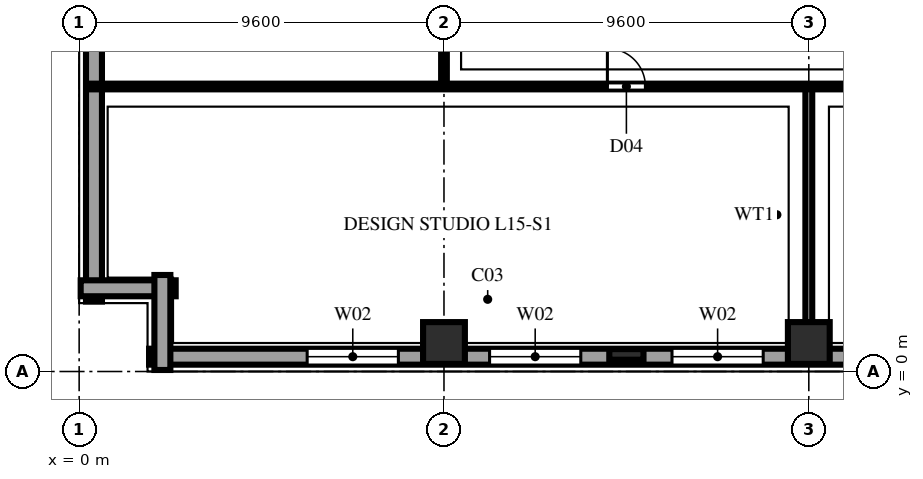
"""IFC4 building model, lengths in metres.
Left out: names, types, materials, properties, quantities, classifications, styles, units other than length and angle.
Written with IfcOpenShell. Run it as: python <this file> out.ifc"""

import sys

from ifc_helpers import new_model, si_unit, direction, frame, frame_2d, origin, origin_2d, place, context, subcontext, project, spatial, rectangle, extrude, element, fill, save


model = new_model("IFC4")
c1 = context("Model", 3, precision=1e-05, world=origin(), true_north=direction((0.0, 1.0)))
c2 = subcontext(c1, "Body", "Model", "MODEL_VIEW")
j1 = project(units=[si_unit("LENGTHUNIT", "METRE"), si_unit("PLANEANGLEUNIT", "RADIAN")], contexts=[c1])
p1 = place(None, origin())
s1 = spatial("IfcSite", under=j1, at=p1, CompositionType="ELEMENT")
p2 = place(p1, origin())
s2 = spatial("IfcBuilding", under=s1, at=p2, CompositionType="ELEMENT")
p3 = place(p2, frame((0.0, 0.0, 62.2)))
s3 = spatial("IfcBuildingStorey", under=s2, at=p3, CompositionType="ELEMENT", Elevation=62.2)
for number, where, z_axis, x_axis in (
    (1, (9.6, 0.75, 0.0), (0.0, 0.0, 1.0), (1.0, 0.0, 0.0)),
    (2, (19.2, 0.75, 0.0), (0.0, 0.0, 1.0), (1.0, 0.0, 0.0)),
):
    element("IfcColumn", number, at=place(p3, frame(where, z_axis=z_axis, x_axis=x_axis)), inside=s3, PredefinedType="COLUMN", context=c2, shape_type="SweptSolid", body=[
        extrude(rectangle(XDim=1.1, YDim=1.1, at=origin_2d()), origin(), (0.0, 0.0, 1.0), 3.8),
    ])
p4 = place(p3, frame((14.4, 0.45, 0.0), z_axis=(0.0, 0.0, 1.0), x_axis=(1.0, 0.0, 0.0)))
e3 = element("IfcColumn", 3, at=p4, inside=s3, PredefinedType="PILASTER", context=c2, shape_type="SweptSolid", body=[
    extrude(rectangle(XDim=0.9, YDim=0.28, at=origin_2d()), origin(), (0.0, 0.0, 1.0), 3.8),
])
p5 = place(p3, frame((1.84, 0.39, 0.0), z_axis=(0.0, 0.0, 1.0), x_axis=(1.0, 0.0, 0.0)))
e4 = element("IfcWall", 4, at=p5, inside=s3, PredefinedType="SOLIDWALL", context=c2, shape_type="SweptSolid", body=[
    extrude(rectangle(XDim=63.52, YDim=0.42, at=frame_2d((31.76, 0.0))), origin(), (0.0, 0.0, 1.0), 3.54),
])
p6 = place(p5, frame((4.16, 0.0, 0.85)))
e5 = element("IfcOpeningElement", 5, at=p6, cuts=e4, PredefinedType="OPENING", context=c2, shape_type="SweptSolid", body=[
    extrude(rectangle(XDim=2.4, YDim=1.85, at=frame_2d((1.2, 0.925))), frame((0.0, 0.222, 0.0), z_axis=(0.0, -1.0, 0.0), x_axis=(1.0, 0.0, 0.0)), (0.0, 0.0, 1.0), 0.444),
])
p7 = place(p5, frame((8.96, 0.0, 0.85)))
e6 = element("IfcOpeningElement", 6, at=p7, cuts=e4, PredefinedType="OPENING", context=c2, shape_type="SweptSolid", body=[
    extrude(rectangle(XDim=2.4, YDim=1.85, at=frame_2d((1.2, 0.925))), frame((0.0, 0.222, 0.0), z_axis=(0.0, -1.0, 0.0), x_axis=(1.0, 0.0, 0.0)), (0.0, 0.0, 1.0), 0.444),
])
p8 = place(p5, frame((13.76, 0.0, 0.85)))
e7 = element("IfcOpeningElement", 7, at=p8, cuts=e4, PredefinedType="OPENING", context=c2, shape_type="SweptSolid", body=[
    extrude(rectangle(XDim=2.4, YDim=1.85, at=frame_2d((1.2, 0.925))), frame((0.0, 0.222, 0.0), z_axis=(0.0, -1.0, 0.0), x_axis=(1.0, 0.0, 0.0)), (0.0, 0.0, 1.0), 0.444),
])
p9 = place(p5, frame((18.56, 0.0, 0.85)))
e8 = element("IfcOpeningElement", 8, at=p9, cuts=e4, PredefinedType="OPENING", context=c2, shape_type="SweptSolid", body=[
    extrude(rectangle(XDim=2.4, YDim=1.85, at=frame_2d((1.2, 0.925))), frame((0.0, 0.222, 0.0), z_axis=(0.0, -1.0, 0.0), x_axis=(1.0, 0.0, 0.0)), (0.0, 0.0, 1.0), 0.444),
])
p10 = place(p5, frame((23.36, 0.0, 0.85)))
e9 = element("IfcOpeningElement", 9, at=p10, cuts=e4, PredefinedType="OPENING", context=c2, shape_type="SweptSolid", body=[
    extrude(rectangle(XDim=2.4, YDim=1.85, at=frame_2d((1.2, 0.925))), frame((0.0, 0.222, 0.0), z_axis=(0.0, -1.0, 0.0), x_axis=(1.0, 0.0, 0.0)), (0.0, 0.0, 1.0), 0.444),
])
p11 = place(p5, frame((28.16, 0.0, 0.85)))
e10 = element("IfcOpeningElement", 10, at=p11, cuts=e4, PredefinedType="OPENING", context=c2, shape_type="SweptSolid", body=[
    extrude(rectangle(XDim=2.4, YDim=1.85, at=frame_2d((1.2, 0.925))), frame((0.0, 0.222, 0.0), z_axis=(0.0, -1.0, 0.0), x_axis=(1.0, 0.0, 0.0)), (0.0, 0.0, 1.0), 0.444),
])
p12 = place(p3, frame((0.39, 65.36, 0.0), z_axis=(0.0, 0.0, 1.0), x_axis=(0.0, -1.0, 0.0)))
e11 = element("IfcWall", 11, at=p12, inside=s3, PredefinedType="SOLIDWALL", context=c2, shape_type="SweptSolid", body=[
    extrude(rectangle(XDim=63.52, YDim=0.42, at=frame_2d((31.76, 0.0))), origin(), (0.0, 0.0, 1.0), 3.54),
])
p13 = place(p12, frame((4.885, 0.0, 0.9)))
e12 = element("IfcOpeningElement", 12, at=p13, cuts=e11, PredefinedType="OPENING", context=c2, shape_type="SweptSolid", body=[
    extrude(rectangle(XDim=0.95, YDim=1.85, at=frame_2d((0.475, 0.925))), frame((0.0, 0.222, 0.0), z_axis=(0.0, -1.0, 0.0), x_axis=(1.0, 0.0, 0.0)), (0.0, 0.0, 1.0), 0.444),
])
p14 = place(p12, frame((9.41, 0.0, 0.9)))
e13 = element("IfcOpeningElement", 13, at=p14, cuts=e11, PredefinedType="OPENING", context=c2, shape_type="SweptSolid", body=[
    extrude(rectangle(XDim=1.5, YDim=1.85, at=frame_2d((0.75, 0.925))), frame((0.0, 0.222, 0.0), z_axis=(0.0, -1.0, 0.0), x_axis=(1.0, 0.0, 0.0)), (0.0, 0.0, 1.0), 0.444),
])
p15 = place(p12, frame((14.485, 0.0, 0.9)))
e14 = element("IfcOpeningElement", 14, at=p15, cuts=e11, PredefinedType="OPENING", context=c2, shape_type="SweptSolid", body=[
    extrude(rectangle(XDim=0.95, YDim=1.85, at=frame_2d((0.475, 0.925))), frame((0.0, 0.222, 0.0), z_axis=(0.0, -1.0, 0.0), x_axis=(1.0, 0.0, 0.0)), (0.0, 0.0, 1.0), 0.444),
])
p16 = place(p12, frame((19.01, 0.0, 0.9)))
e15 = element("IfcOpeningElement", 15, at=p16, cuts=e11, PredefinedType="OPENING", context=c2, shape_type="SweptSolid", body=[
    extrude(rectangle(XDim=1.5, YDim=1.85, at=frame_2d((0.75, 0.925))), frame((0.0, 0.222, 0.0), z_axis=(0.0, -1.0, 0.0), x_axis=(1.0, 0.0, 0.0)), (0.0, 0.0, 1.0), 0.444),
])
p17 = place(p12, frame((24.085, 0.0, 0.9)))
e16 = element("IfcOpeningElement", 16, at=p17, cuts=e11, PredefinedType="OPENING", context=c2, shape_type="SweptSolid", body=[
    extrude(rectangle(XDim=0.95, YDim=1.85, at=frame_2d((0.475, 0.925))), frame((0.0, 0.222, 0.0), z_axis=(0.0, -1.0, 0.0), x_axis=(1.0, 0.0, 0.0)), (0.0, 0.0, 1.0), 0.444),
])
p18 = place(p12, frame((28.61, 0.0, 0.9)))
e17 = element("IfcOpeningElement", 17, at=p18, cuts=e11, PredefinedType="OPENING", context=c2, shape_type="SweptSolid", body=[
    extrude(rectangle(XDim=1.5, YDim=1.85, at=frame_2d((0.75, 0.925))), frame((0.0, 0.222, 0.0), z_axis=(0.0, -1.0, 0.0), x_axis=(1.0, 0.0, 0.0)), (0.0, 0.0, 1.0), 0.444),
])
p19 = place(p12, frame((33.685, 0.0, 0.9)))
e18 = element("IfcOpeningElement", 18, at=p19, cuts=e11, PredefinedType="OPENING", context=c2, shape_type="SweptSolid", body=[
    extrude(rectangle(XDim=0.95, YDim=1.85, at=frame_2d((0.475, 0.925))), frame((0.0, 0.222, 0.0), z_axis=(0.0, -1.0, 0.0), x_axis=(1.0, 0.0, 0.0)), (0.0, 0.0, 1.0), 0.444),
])
p20 = place(p12, frame((38.21, 0.0, 0.9)))
e19 = element("IfcOpeningElement", 19, at=p20, cuts=e11, PredefinedType="OPENING", context=c2, shape_type="SweptSolid", body=[
    extrude(rectangle(XDim=1.5, YDim=1.85, at=frame_2d((0.75, 0.925))), frame((0.0, 0.222, 0.0), z_axis=(0.0, -1.0, 0.0), x_axis=(1.0, 0.0, 0.0)), (0.0, 0.0, 1.0), 0.444),
])
p21 = place(p12, frame((43.285, 0.0, 0.9)))
e20 = element("IfcOpeningElement", 20, at=p21, cuts=e11, PredefinedType="OPENING", context=c2, shape_type="SweptSolid", body=[
    extrude(rectangle(XDim=0.95, YDim=1.85, at=frame_2d((0.475, 0.925))), frame((0.0, 0.222, 0.0), z_axis=(0.0, -1.0, 0.0), x_axis=(1.0, 0.0, 0.0)), (0.0, 0.0, 1.0), 0.444),
])
p22 = place(p12, frame((47.81, 0.0, 0.9)))
e21 = element("IfcOpeningElement", 21, at=p22, cuts=e11, PredefinedType="OPENING", context=c2, shape_type="SweptSolid", body=[
    extrude(rectangle(XDim=1.5, YDim=1.85, at=frame_2d((0.75, 0.925))), frame((0.0, 0.222, 0.0), z_axis=(0.0, -1.0, 0.0), x_axis=(1.0, 0.0, 0.0)), (0.0, 0.0, 1.0), 0.444),
])
p23 = place(p12, frame((52.885, 0.0, 0.9)))
e22 = element("IfcOpeningElement", 22, at=p23, cuts=e11, PredefinedType="OPENING", context=c2, shape_type="SweptSolid", body=[
    extrude(rectangle(XDim=0.95, YDim=1.85, at=frame_2d((0.475, 0.925))), frame((0.0, 0.222, 0.0), z_axis=(0.0, -1.0, 0.0), x_axis=(1.0, 0.0, 0.0)), (0.0, 0.0, 1.0), 0.444),
])
for number, where, z_axis, x_axis in (
    (23, (0.04, 2.19, 0.0), (0.0, 0.0, 1.0), (1.0, 0.0, 0.0)),
    (24, (2.19, 2.54, 0.0), (0.0, 0.0, 1.0), (0.0, -1.0, 0.0)),
):
    element("IfcWall", number, at=place(p3, frame(where, z_axis=z_axis, x_axis=x_axis)), inside=s3, PredefinedType="SOLIDWALL", context=c2, shape_type="SweptSolid", body=[
        extrude(rectangle(XDim=2.5, YDim=0.42, at=frame_2d((1.25, 0.0))), origin(), (0.0, 0.0, 1.0), 3.54),
    ])
p24 = place(p3, frame((9.6, 7.5, 0.0), z_axis=(0.0, 0.0, 1.0), x_axis=(0.0, 1.0, 0.0)))
e25 = element("IfcWall", 25, at=p24, inside=s3, PredefinedType="PARTITIONING", context=c2, shape_type="SweptSolid", body=[
    extrude(rectangle(XDim=2.1, YDim=0.15, at=frame_2d((1.05, 0.0))), origin(), (0.0, 0.0, 1.0), 2.923),
])
p25 = place(p3, frame((19.2, 0.22, 0.0), z_axis=(0.0, 0.0, 1.0), x_axis=(0.0, 1.0, 0.0)))
e26 = element("IfcWall", 26, at=p25, inside=s3, PredefinedType="PARTITIONING", context=c2, shape_type="SweptSolid", body=[
    extrude(rectangle(XDim=0.53, YDim=0.18, at=frame_2d((0.265, 0.0))), origin(), (0.0, 0.0, 1.0), 3.54),
])
p26 = place(p3, frame((19.2, 0.75, 0.0), z_axis=(0.0, 0.0, 1.0), x_axis=(0.0, 1.0, 0.0)))
e27 = element("IfcWall", 27, at=p26, inside=s3, PredefinedType="PARTITIONING", context=c2, shape_type="SweptSolid", body=[
    extrude(rectangle(XDim=6.75, YDim=0.18, at=frame_2d((3.375, 0.0))), origin(), (0.0, 0.0, 1.0), 2.923),
])
p27 = place(p3, frame((0.22, 7.5, 0.0), z_axis=(0.0, 0.0, 1.0), x_axis=(1.0, 0.0, 0.0)))
e28 = element("IfcWall", 28, at=p27, inside=s3, PredefinedType="PARTITIONING", context=c2, shape_type="SweptSolid", body=[
    extrude(rectangle(XDim=57.38, YDim=0.15, at=frame_2d((28.69, 0.0))), origin(), (0.0, 0.0, 1.0), 3.54),
])
p28 = place(p27, frame((13.68, 0.0, 0.0)))
e29 = element("IfcOpeningElement", 29, at=p28, cuts=e28, PredefinedType="OPENING", context=c2, shape_type="SweptSolid", body=[
    extrude(rectangle(XDim=1.0, YDim=2.2, at=frame_2d((0.5, 1.1))), frame((0.0, 0.087, 0.0), z_axis=(0.0, -1.0, 0.0), x_axis=(1.0, 0.0, 0.0)), (0.0, 0.0, 1.0), 0.174),
])
p29 = place(p27, frame((23.28, 0.0, 0.0)))
e30 = element("IfcOpeningElement", 30, at=p29, cuts=e28, PredefinedType="OPENING", context=c2, shape_type="SweptSolid", body=[
    extrude(rectangle(XDim=1.0, YDim=2.2, at=frame_2d((0.5, 1.1))), frame((0.0, 0.087, 0.0), z_axis=(0.0, -1.0, 0.0), x_axis=(1.0, 0.0, 0.0)), (0.0, 0.0, 1.0), 0.174),
])
p30 = place(p27, frame((41.68, 0.0, 0.0)))
e31 = element("IfcOpeningElement", 31, at=p30, cuts=e28, PredefinedType="OPENING", context=c2, shape_type="SweptSolid", body=[
    extrude(rectangle(XDim=1.2, YDim=2.2, at=frame_2d((0.6, 1.1))), frame((0.0, 0.087, 0.0), z_axis=(0.0, -1.0, 0.0), x_axis=(1.0, 0.0, 0.0)), (0.0, 0.0, 1.0), 0.174),
])
p31 = place(p27, frame((51.33, 0.0, 0.0)))
e32 = element("IfcOpeningElement", 32, at=p31, cuts=e28, PredefinedType="OPENING", context=c2, shape_type="SweptSolid", body=[
    extrude(rectangle(XDim=1.0, YDim=2.2, at=frame_2d((0.5, 1.1))), frame((0.0, 0.087, 0.0), z_axis=(0.0, -1.0, 0.0), x_axis=(1.0, 0.0, 0.0)), (0.0, 0.0, 1.0), 0.174),
])
p32 = place(p6, origin())
e33 = element("IfcWindow", 33, at=p32, inside=s3, PartitioningType="TRIPLE_PANEL_VERTICAL", PredefinedType="WINDOW", context=c2, shape_type="SweptSolid", body=[
    extrude(rectangle(XDim=2.4, YDim=1.85, at=frame_2d((1.2, 0.925))), frame((0.0, 0.11, 0.0), z_axis=(0.0, -1.0, 0.0), x_axis=(1.0, 0.0, 0.0)), (0.0, 0.0, 1.0), 0.06),
])
fill(e5, e33)
p33 = place(p7, origin())
e34 = element("IfcWindow", 34, at=p33, inside=s3, PartitioningType="TRIPLE_PANEL_VERTICAL", PredefinedType="WINDOW", context=c2, shape_type="SweptSolid", body=[
    extrude(rectangle(XDim=2.4, YDim=1.85, at=frame_2d((1.2, 0.925))), frame((0.0, 0.11, 0.0), z_axis=(0.0, -1.0, 0.0), x_axis=(1.0, 0.0, 0.0)), (0.0, 0.0, 1.0), 0.06),
])
fill(e6, e34)
p34 = place(p8, origin())
e35 = element("IfcWindow", 35, at=p34, inside=s3, PartitioningType="TRIPLE_PANEL_VERTICAL", PredefinedType="WINDOW", context=c2, shape_type="SweptSolid", body=[
    extrude(rectangle(XDim=2.4, YDim=1.85, at=frame_2d((1.2, 0.925))), frame((0.0, 0.11, 0.0), z_axis=(0.0, -1.0, 0.0), x_axis=(1.0, 0.0, 0.0)), (0.0, 0.0, 1.0), 0.06),
])
fill(e7, e35)
p35 = place(p28, origin())
e36 = element("IfcDoor", 36, at=p35, inside=s3, OperationType="SINGLE_SWING_LEFT", PredefinedType="DOOR", context=c2, shape_type="SweptSolid", body=[
    extrude(rectangle(XDim=1.0, YDim=2.2, at=frame_2d((0.5, 1.1))), frame((0.0, 0.025, 0.0), z_axis=(0.0, -1.0, 0.0), x_axis=(1.0, 0.0, 0.0)), (0.0, 0.0, 1.0), 0.05),
])
fill(e29, e36)
save(model, sys.argv[1])
